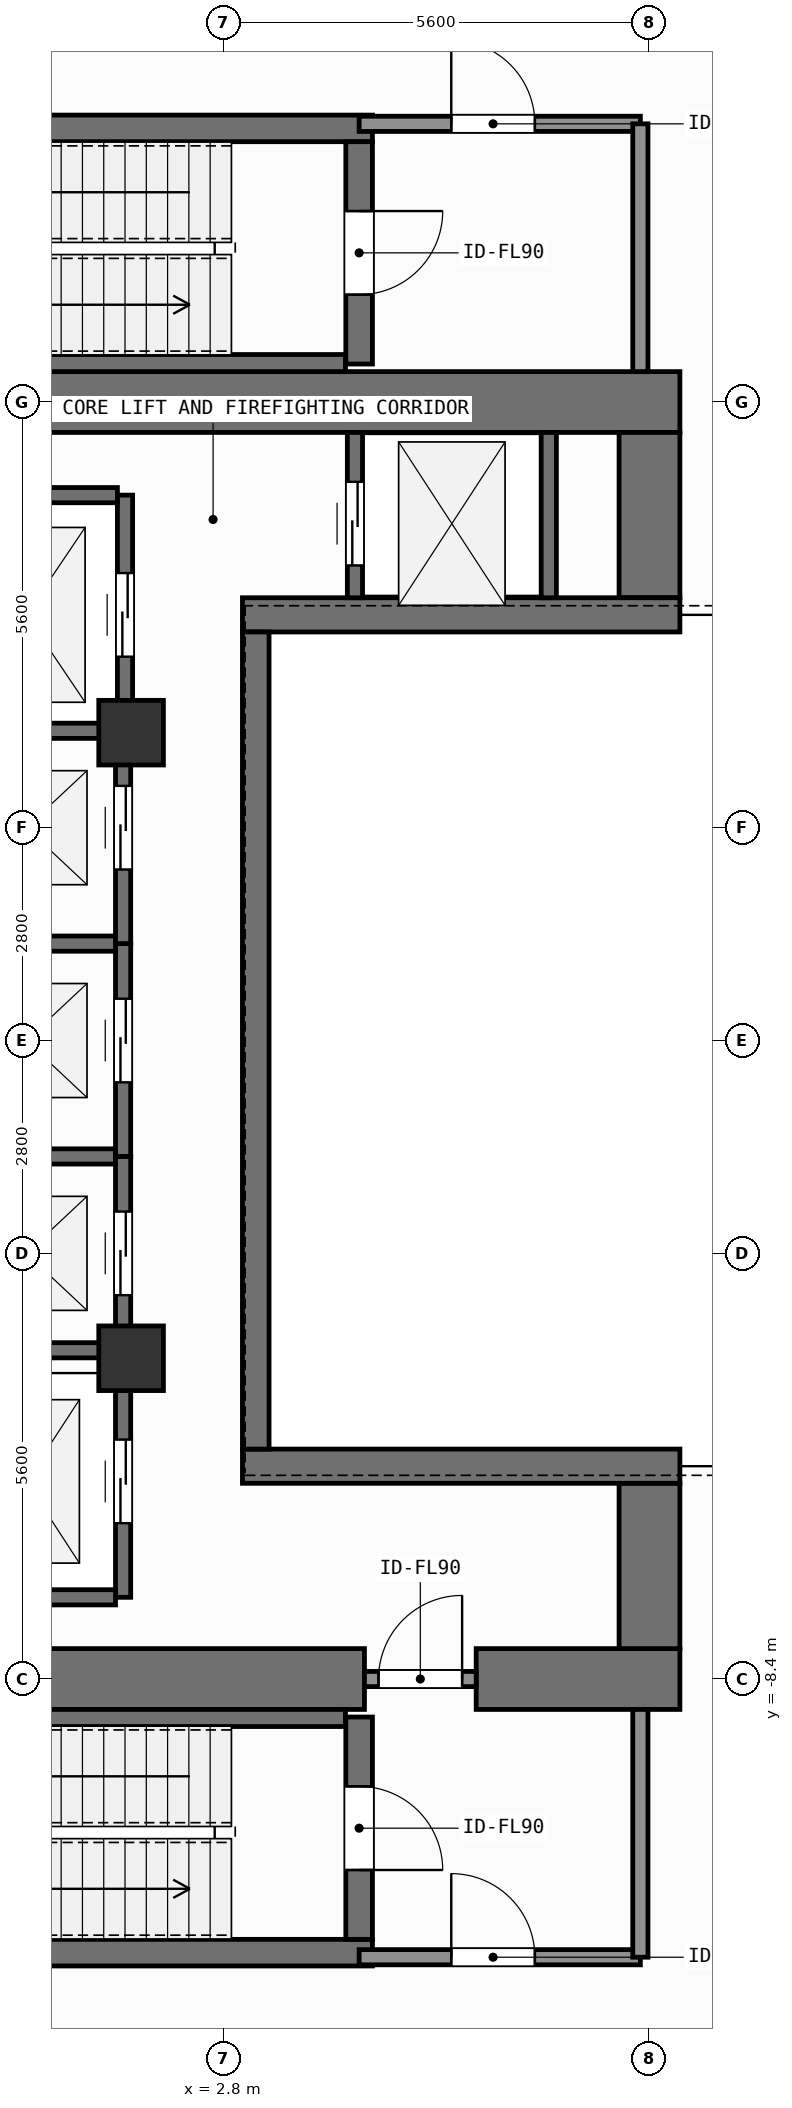
"""IFC4 building model, lengths in metres.
Left out: names, types, materials, properties, quantities, classifications, styles, units other than length and angle.
Written with IfcOpenShell. Run it as: python <this file> out.ifc"""

import sys

from ifc_helpers import new_model, si_unit, direction, frame, frame_2d, origin, origin_2d, place, context, subcontext, project, spatial, rectangle, extrude, element, fill, save


model = new_model("IFC4")
c1 = context("Model", 3, precision=1e-05, world=origin(), true_north=direction((0.0, 1.0)))
c2 = subcontext(c1, "Body", "Model", "MODEL_VIEW")
j1 = project(units=[si_unit("LENGTHUNIT", "METRE"), si_unit("PLANEANGLEUNIT", "RADIAN")], contexts=[c1])
p1 = place(None, origin())
s1 = spatial("IfcSite", under=j1, at=p1, CompositionType="ELEMENT")
p2 = place(p1, origin())
s2 = spatial("IfcBuilding", under=s1, at=p2, CompositionType="ELEMENT")
p3 = place(p2, frame((0.0, 0.0, 210.9)))
s3 = spatial("IfcBuildingStorey", under=s2, at=p3, CompositionType="ELEMENT", Elevation=210.9)
p4 = place(p3, frame((-2.62, -8.4, 0.0), z_axis=(0.0, 0.0, 1.0), x_axis=(1.0, 0.0, 0.0)))
e1 = element("IfcWall", 1, at=p4, inside=s3, PredefinedType="SHEAR", context=c2, shape_type="SweptSolid", body=[
    extrude(rectangle(XDim=7.27, YDim=0.8, at=frame_2d((3.635, 0.0))), origin(), (0.0, 0.0, 1.0), 4.8),
])
p5 = place(p3, frame((6.12, -8.4, 0.0), z_axis=(0.0, 0.0, 1.0), x_axis=(1.0, 0.0, 0.0)))
e2 = element("IfcWall", 2, at=p5, inside=s3, PredefinedType="SHEAR", context=c2, shape_type="SweptSolid", body=[
    extrude(rectangle(XDim=2.68, YDim=0.8, at=frame_2d((1.34, 0.0))), origin(), (0.0, 0.0, 1.0), 4.8),
])
p6 = place(p3, frame((-7.55, 8.4, 0.0), z_axis=(0.0, 0.0, 1.0), x_axis=(1.0, 0.0, 0.0)))
e3 = element("IfcWall", 3, at=p6, inside=s3, PredefinedType="SHEAR", context=c2, shape_type="SweptSolid", body=[
    extrude(rectangle(XDim=16.35, YDim=0.8, at=frame_2d((8.175, 0.0))), origin(), (0.0, 0.0, 1.0), 4.8),
])
for number, where, z_axis, x_axis in (
    (4, (8.4, -8.0, 0.0), (0.0, 0.0, 1.0), (0.0, 1.0, 0.0)),
    (5, (8.4, 5.825, 0.0), (0.0, 0.0, 1.0), (0.0, 1.0, 0.0)),
):
    element("IfcWall", number, at=place(p3, frame(where, z_axis=z_axis, x_axis=x_axis)), inside=s3, PredefinedType="SHEAR", context=c2, shape_type="SweptSolid", body=[
        extrude(rectangle(XDim=2.175, YDim=0.8, at=frame_2d((1.087, 0.0))), origin(), (0.0, 0.0, 1.0), 4.8),
    ])
for number, where, z_axis, x_axis in (
    (6, (3.045, -5.6, 0.0), (0.0, 0.0, 1.0), (1.0, 0.0, 0.0)),
    (7, (3.045, 5.6, 0.0), (0.0, 0.0, 1.0), (1.0, 0.0, 0.0)),
):
    element("IfcWall", number, at=place(p3, frame(where, z_axis=z_axis, x_axis=x_axis)), inside=s3, PredefinedType="SHEAR", context=c2, shape_type="SweptSolid", body=[
        extrude(rectangle(XDim=5.755, YDim=0.45, at=frame_2d((2.877, 0.0))), origin(), (0.0, 0.0, 1.0), 4.8),
    ])
p7 = place(p3, frame((3.22, -5.375, 0.0), z_axis=(0.0, 0.0, 1.0), x_axis=(0.0, 1.0, 0.0)))
e8 = element("IfcWall", 8, at=p7, inside=s3, PredefinedType="SHEAR", context=c2, shape_type="SweptSolid", body=[
    extrude(rectangle(XDim=10.75, YDim=0.35, at=frame_2d((5.375, 0.0))), origin(), (0.0, 0.0, 1.0), 4.8),
])
p8 = place(p3, frame((-2.555, -12.0, 0.0), z_axis=(0.0, 0.0, 1.0), x_axis=(1.0, 0.0, 0.0)))
e9 = element("IfcWall", 9, at=p8, inside=s3, PredefinedType="SHEAR", context=c2, shape_type="SweptSolid", body=[
    extrude(rectangle(XDim=7.31, YDim=0.35, at=frame_2d((3.655, 0.0))), origin(), (0.0, 0.0, 1.0), 4.8),
])
p9 = place(p3, frame((-2.2, -8.913, 0.0), z_axis=(0.0, 0.0, 1.0), x_axis=(1.0, 0.0, 0.0)))
e10 = element("IfcWall", 10, at=p9, inside=s3, PredefinedType="SHEAR", context=c2, shape_type="SweptSolid", body=[
    extrude(rectangle(XDim=6.6, YDim=0.225, at=frame_2d((3.3, 0.0))), origin(), (0.0, 0.0, 1.0), 4.8),
])
p10 = place(p3, frame((4.58, -8.9, 0.0), z_axis=(0.0, 0.0, 1.0), x_axis=(0.0, -1.0, 0.0)))
e11 = element("IfcWall", 11, at=p10, inside=s3, PredefinedType="SHEAR", context=c2, shape_type="SweptSolid", body=[
    extrude(rectangle(XDim=2.925, YDim=0.35, at=frame_2d((1.462, 0.0))), origin(), (0.0, 0.0, 1.0), 4.8),
])
p11 = place(p10, frame((0.913, 0.0, 0.0)))
e12 = element("IfcOpeningElement", 12, at=p11, cuts=e11, PredefinedType="OPENING", context=c2, shape_type="SweptSolid", body=[
    extrude(rectangle(XDim=1.1, YDim=2.15, at=frame_2d((0.55, 1.075))), frame((0.0, 0.185, 0.0), z_axis=(0.0, -1.0, 0.0), x_axis=(1.0, 0.0, 0.0)), (0.0, 0.0, 1.0), 0.37),
])
p12 = place(p3, frame((-2.555, 12.0, 0.0), z_axis=(0.0, 0.0, 1.0), x_axis=(1.0, 0.0, 0.0)))
e13 = element("IfcWall", 13, at=p12, inside=s3, PredefinedType="SHEAR", context=c2, shape_type="SweptSolid", body=[
    extrude(rectangle(XDim=7.31, YDim=0.35, at=frame_2d((3.655, 0.0))), origin(), (0.0, 0.0, 1.0), 4.8),
])
p13 = place(p3, frame((-2.2, 8.913, 0.0), z_axis=(0.0, 0.0, 1.0), x_axis=(1.0, 0.0, 0.0)))
e14 = element("IfcWall", 14, at=p13, inside=s3, PredefinedType="SHEAR", context=c2, shape_type="SweptSolid", body=[
    extrude(rectangle(XDim=6.6, YDim=0.225, at=frame_2d((3.3, 0.0))), origin(), (0.0, 0.0, 1.0), 4.8),
])
p14 = place(p3, frame((4.58, 11.825, 0.0), z_axis=(0.0, 0.0, 1.0), x_axis=(0.0, -1.0, 0.0)))
e15 = element("IfcWall", 15, at=p14, inside=s3, PredefinedType="SHEAR", context=c2, shape_type="SweptSolid", body=[
    extrude(rectangle(XDim=2.925, YDim=0.35, at=frame_2d((1.462, 0.0))), origin(), (0.0, 0.0, 1.0), 4.8),
])
p15 = place(p14, frame((0.913, 0.0, 0.0)))
e16 = element("IfcOpeningElement", 16, at=p15, cuts=e15, PredefinedType="OPENING", context=c2, shape_type="SweptSolid", body=[
    extrude(rectangle(XDim=1.1, YDim=2.15, at=frame_2d((0.55, 1.075))), frame((0.0, 0.185, 0.0), z_axis=(0.0, -1.0, 0.0), x_axis=(1.0, 0.0, 0.0)), (0.0, 0.0, 1.0), 0.37),
])
for number, where, z_axis, x_axis in (
    (17, (1.58, -4.18, 0.0), (0.0, 0.0, 1.0), (1.0, 0.0, 0.0)),
    (18, (1.58, 4.05, 0.0), (0.0, 0.0, 1.0), (1.0, 0.0, 0.0)),
):
    element("IfcColumn", number, at=place(p3, frame(where, z_axis=z_axis, x_axis=x_axis)), inside=s3, PredefinedType="COLUMN", context=c2, shape_type="SweptSolid", body=[
        extrude(rectangle(XDim=0.85, YDim=0.85, at=origin_2d()), origin(), (0.0, 0.0, 1.0), 4.8),
    ])
p16 = place(p3, frame((1.475, -4.275, 0.0), z_axis=(0.0, 0.0, 1.0), x_axis=(0.0, 1.0, 0.0)))
e19 = element("IfcWall", 19, at=p16, inside=s3, PredefinedType="SHEAR", context=c2, shape_type="SweptSolid", body=[
    extrude(rectangle(XDim=2.75, YDim=0.2, at=frame_2d((1.375, 0.0))), origin(), (0.0, 0.0, 1.0), 4.58),
])
p17 = place(p16, frame((0.925, 0.0, 0.0)))
e20 = element("IfcOpeningElement", 20, at=p17, cuts=e19, PredefinedType="OPENING", context=c2, shape_type="SweptSolid", body=[
    extrude(rectangle(XDim=1.1, YDim=2.2, at=frame_2d((0.55, 1.1))), frame((0.0, 0.11, 0.0), z_axis=(0.0, -1.0, 0.0), x_axis=(1.0, 0.0, 0.0)), (0.0, 0.0, 1.0), 0.22),
])
for number, where, z_axis, x_axis in (
    (21, (-0.975, -4.075, 0.0), (0.0, 0.0, 1.0), (1.0, 0.0, 0.0)),
    (22, (-0.975, -1.525, 0.0), (0.0, 0.0, 1.0), (1.0, 0.0, 0.0)),
):
    element("IfcWall", number, at=place(p3, frame(where, z_axis=z_axis, x_axis=x_axis)), inside=s3, PredefinedType="SHEAR", context=c2, shape_type="SweptSolid", body=[
        extrude(rectangle(XDim=2.35, YDim=0.2, at=frame_2d((1.175, 0.0))), origin(), (0.0, 0.0, 1.0), 4.58),
    ])
p18 = place(p3, frame((1.475, -1.525, 0.0), z_axis=(0.0, 0.0, 1.0), x_axis=(0.0, 1.0, 0.0)))
e23 = element("IfcWall", 23, at=p18, inside=s3, PredefinedType="SHEAR", context=c2, shape_type="SweptSolid", body=[
    extrude(rectangle(XDim=2.8, YDim=0.2, at=frame_2d((1.4, 0.0))), origin(), (0.0, 0.0, 1.0), 4.58),
])
p19 = place(p18, frame((0.975, 0.0, 0.0)))
e24 = element("IfcOpeningElement", 24, at=p19, cuts=e23, PredefinedType="OPENING", context=c2, shape_type="SweptSolid", body=[
    extrude(rectangle(XDim=1.1, YDim=2.2, at=frame_2d((0.55, 1.1))), frame((0.0, 0.11, 0.0), z_axis=(0.0, -1.0, 0.0), x_axis=(1.0, 0.0, 0.0)), (0.0, 0.0, 1.0), 0.22),
])
p20 = place(p3, frame((-0.975, 1.275, 0.0), z_axis=(0.0, 0.0, 1.0), x_axis=(1.0, 0.0, 0.0)))
e25 = element("IfcWall", 25, at=p20, inside=s3, PredefinedType="SHEAR", context=c2, shape_type="SweptSolid", body=[
    extrude(rectangle(XDim=2.35, YDim=0.2, at=frame_2d((1.175, 0.0))), origin(), (0.0, 0.0, 1.0), 4.58),
])
p21 = place(p3, frame((1.475, 1.275, 0.0), z_axis=(0.0, 0.0, 1.0), x_axis=(0.0, 1.0, 0.0)))
e26 = element("IfcWall", 26, at=p21, inside=s3, PredefinedType="SHEAR", context=c2, shape_type="SweptSolid", body=[
    extrude(rectangle(XDim=2.8, YDim=0.2, at=frame_2d((1.4, 0.0))), origin(), (0.0, 0.0, 1.0), 4.58),
])
p22 = place(p21, frame((0.975, 0.0, 0.0)))
e27 = element("IfcOpeningElement", 27, at=p22, cuts=e26, PredefinedType="OPENING", context=c2, shape_type="SweptSolid", body=[
    extrude(rectangle(XDim=1.1, YDim=2.2, at=frame_2d((0.55, 1.1))), frame((0.0, 0.11, 0.0), z_axis=(0.0, -1.0, 0.0), x_axis=(1.0, 0.0, 0.0)), (0.0, 0.0, 1.0), 0.22),
])
p23 = place(p3, frame((-0.975, 4.075, 0.0), z_axis=(0.0, 0.0, 1.0), x_axis=(1.0, 0.0, 0.0)))
e28 = element("IfcWall", 28, at=p23, inside=s3, PredefinedType="SHEAR", context=c2, shape_type="SweptSolid", body=[
    extrude(rectangle(XDim=2.35, YDim=0.2, at=frame_2d((1.175, 0.0))), origin(), (0.0, 0.0, 1.0), 4.58),
])
p24 = place(p3, frame((1.5, 4.025, 0.0), z_axis=(0.0, 0.0, 1.0), x_axis=(0.0, 1.0, 0.0)))
e29 = element("IfcWall", 29, at=p24, inside=s3, PredefinedType="SHEAR", context=c2, shape_type="SweptSolid", body=[
    extrude(rectangle(XDim=3.15, YDim=0.2, at=frame_2d((1.575, 0.0))), origin(), (0.0, 0.0, 1.0), 4.58),
])
p25 = place(p24, frame((1.025, 0.0, 0.0)))
e30 = element("IfcOpeningElement", 30, at=p25, cuts=e29, PredefinedType="OPENING", context=c2, shape_type="SweptSolid", body=[
    extrude(rectangle(XDim=1.1, YDim=2.2, at=frame_2d((0.55, 1.1))), frame((0.0, 0.11, 0.0), z_axis=(0.0, -1.0, 0.0), x_axis=(1.0, 0.0, 0.0)), (0.0, 0.0, 1.0), 0.22),
])
p26 = place(p3, frame((-1.0, 7.175, 0.0), z_axis=(0.0, 0.0, 1.0), x_axis=(1.0, 0.0, 0.0)))
e31 = element("IfcWall", 31, at=p26, inside=s3, PredefinedType="SHEAR", context=c2, shape_type="SweptSolid", body=[
    extrude(rectangle(XDim=2.4, YDim=0.2, at=frame_2d((1.2, 0.0))), origin(), (0.0, 0.0, 1.0), 4.58),
])
p27 = place(p3, frame((1.475, -7.325, 0.0), z_axis=(0.0, 0.0, 1.0), x_axis=(0.0, 1.0, 0.0)))
e32 = element("IfcWall", 32, at=p27, inside=s3, PredefinedType="SHEAR", context=c2, shape_type="SweptSolid", body=[
    extrude(rectangle(XDim=3.05, YDim=0.2, at=frame_2d((1.525, 0.0))), origin(), (0.0, 0.0, 1.0), 4.58),
])
p28 = place(p27, frame((0.975, 0.0, 0.0)))
e33 = element("IfcOpeningElement", 33, at=p28, cuts=e32, PredefinedType="OPENING", context=c2, shape_type="SweptSolid", body=[
    extrude(rectangle(XDim=1.1, YDim=2.2, at=frame_2d((0.55, 1.1))), frame((0.0, 0.11, 0.0), z_axis=(0.0, -1.0, 0.0), x_axis=(1.0, 0.0, 0.0)), (0.0, 0.0, 1.0), 0.22),
])
p29 = place(p3, frame((-0.975, -7.325, 0.0), z_axis=(0.0, 0.0, 1.0), x_axis=(1.0, 0.0, 0.0)))
e34 = element("IfcWall", 34, at=p29, inside=s3, PredefinedType="SHEAR", context=c2, shape_type="SweptSolid", body=[
    extrude(rectangle(XDim=2.35, YDim=0.2, at=frame_2d((1.175, 0.0))), origin(), (0.0, 0.0, 1.0), 4.58),
])
p30 = place(p3, frame((4.525, 5.825, 0.0), z_axis=(0.0, 0.0, 1.0), x_axis=(0.0, 1.0, 0.0)))
e35 = element("IfcWall", 35, at=p30, inside=s3, PredefinedType="SHEAR", context=c2, shape_type="SweptSolid", body=[
    extrude(rectangle(XDim=2.175, YDim=0.2, at=frame_2d((1.087, 0.0))), origin(), (0.0, 0.0, 1.0), 4.58),
])
p31 = place(p30, frame((0.425, 0.0, 0.0)))
e36 = element("IfcOpeningElement", 36, at=p31, cuts=e35, PredefinedType="OPENING", context=c2, shape_type="SweptSolid", body=[
    extrude(rectangle(XDim=1.1, YDim=2.2, at=frame_2d((0.55, 1.1))), frame((0.0, 0.11, 0.0), z_axis=(0.0, -1.0, 0.0), x_axis=(1.0, 0.0, 0.0)), (0.0, 0.0, 1.0), 0.22),
])
p32 = place(p3, frame((7.075, 5.825, 0.0), z_axis=(0.0, 0.0, 1.0), x_axis=(0.0, 1.0, 0.0)))
e37 = element("IfcWall", 37, at=p32, inside=s3, PredefinedType="SHEAR", context=c2, shape_type="SweptSolid", body=[
    extrude(rectangle(XDim=2.175, YDim=0.2, at=frame_2d((1.087, 0.0))), origin(), (0.0, 0.0, 1.0), 4.58),
])
p33 = place(p3, frame((4.58, -12.06, 0.0), z_axis=(0.0, 0.0, 1.0), x_axis=(1.0, 0.0, 0.0)))
e38 = element("IfcWall", 38, at=p33, inside=s3, PredefinedType="SOLIDWALL", context=c2, shape_type="SweptSolid", body=[
    extrude(rectangle(XDim=3.7, YDim=0.2, at=frame_2d((1.85, 0.0))), origin(), (0.0, 0.0, 1.0), 4.58),
])
p34 = place(p33, frame((1.212, 0.0, 0.0)))
e39 = element("IfcOpeningElement", 39, at=p34, cuts=e38, PredefinedType="OPENING", context=c2, shape_type="SweptSolid", body=[
    extrude(rectangle(XDim=1.1, YDim=2.15, at=frame_2d((0.55, 1.075))), frame((0.0, 0.11, 0.0), z_axis=(0.0, -1.0, 0.0), x_axis=(1.0, 0.0, 0.0)), (0.0, 0.0, 1.0), 0.22),
])
p35 = place(p3, frame((4.65, -8.4, 0.0), z_axis=(0.0, 0.0, 1.0), x_axis=(1.0, 0.0, 0.0)))
e40 = element("IfcWall", 40, at=p35, inside=s3, PredefinedType="SOLIDWALL", context=c2, shape_type="SweptSolid", body=[
    extrude(rectangle(XDim=1.47, YDim=0.2, at=frame_2d((0.735, 0.0))), origin(), (0.0, 0.0, 1.0), 3.72),
])
p36 = place(p35, frame((0.185, 0.0, 0.0)))
e41 = element("IfcOpeningElement", 41, at=p36, cuts=e40, PredefinedType="OPENING", context=c2, shape_type="SweptSolid", body=[
    extrude(rectangle(XDim=1.1, YDim=2.15, at=frame_2d((0.55, 1.075))), frame((0.0, 0.11, 0.0), z_axis=(0.0, -1.0, 0.0), x_axis=(1.0, 0.0, 0.0)), (0.0, 0.0, 1.0), 0.22),
])
p37 = place(p3, frame((4.58, 12.06, 0.0), z_axis=(0.0, 0.0, 1.0), x_axis=(1.0, 0.0, 0.0)))
e42 = element("IfcWall", 42, at=p37, inside=s3, PredefinedType="SOLIDWALL", context=c2, shape_type="SweptSolid", body=[
    extrude(rectangle(XDim=3.7, YDim=0.2, at=frame_2d((1.85, 0.0))), origin(), (0.0, 0.0, 1.0), 4.58),
])
p38 = place(p37, frame((1.212, 0.0, 0.0)))
e43 = element("IfcOpeningElement", 43, at=p38, cuts=e42, PredefinedType="OPENING", context=c2, shape_type="SweptSolid", body=[
    extrude(rectangle(XDim=1.1, YDim=2.15, at=frame_2d((0.55, 1.075))), frame((0.0, 0.11, 0.0), z_axis=(0.0, -1.0, 0.0), x_axis=(1.0, 0.0, 0.0)), (0.0, 0.0, 1.0), 0.22),
])
for number, where, z_axis, x_axis in (
    (44, (8.28, -12.06, 0.0), (0.0, 0.0, 1.0), (0.0, 1.0, 0.0)),
    (45, (8.28, 8.8, 0.0), (0.0, 0.0, 1.0), (0.0, 1.0, 0.0)),
):
    element("IfcWall", number, at=place(p3, frame(where, z_axis=z_axis, x_axis=x_axis)), inside=s3, PredefinedType="SOLIDWALL", context=c2, shape_type="SweptSolid", body=[
        extrude(rectangle(XDim=3.26, YDim=0.2, at=frame_2d((1.63, 0.0))), origin(), (0.0, 0.0, 1.0), 4.58),
    ])
p39 = place(p17, origin())
e46 = element("IfcDoor", 46, at=p39, inside=s3, OperationType="SLIDING_TO_LEFT", PredefinedType="DOOR", context=c2, shape_type="SweptSolid", body=[
    extrude(rectangle(XDim=1.1, YDim=2.2, at=frame_2d((0.55, 1.1))), frame((0.0, 0.025, 0.0), z_axis=(0.0, -1.0, 0.0), x_axis=(1.0, 0.0, 0.0)), (0.0, 0.0, 1.0), 0.05),
])
fill(e20, e46)
p40 = place(p19, origin())
e47 = element("IfcDoor", 47, at=p40, inside=s3, OperationType="SLIDING_TO_LEFT", PredefinedType="DOOR", context=c2, shape_type="SweptSolid", body=[
    extrude(rectangle(XDim=1.1, YDim=2.2, at=frame_2d((0.55, 1.1))), frame((0.0, 0.025, 0.0), z_axis=(0.0, -1.0, 0.0), x_axis=(1.0, 0.0, 0.0)), (0.0, 0.0, 1.0), 0.05),
])
fill(e24, e47)
p41 = place(p22, origin())
e48 = element("IfcDoor", 48, at=p41, inside=s3, OperationType="SLIDING_TO_LEFT", PredefinedType="DOOR", context=c2, shape_type="SweptSolid", body=[
    extrude(rectangle(XDim=1.1, YDim=2.2, at=frame_2d((0.55, 1.1))), frame((0.0, 0.025, 0.0), z_axis=(0.0, -1.0, 0.0), x_axis=(1.0, 0.0, 0.0)), (0.0, 0.0, 1.0), 0.05),
])
fill(e27, e48)
p42 = place(p25, origin())
e49 = element("IfcDoor", 49, at=p42, inside=s3, OperationType="SLIDING_TO_LEFT", PredefinedType="DOOR", context=c2, shape_type="SweptSolid", body=[
    extrude(rectangle(XDim=1.1, YDim=2.2, at=frame_2d((0.55, 1.1))), frame((0.0, 0.025, 0.0), z_axis=(0.0, -1.0, 0.0), x_axis=(1.0, 0.0, 0.0)), (0.0, 0.0, 1.0), 0.05),
])
fill(e30, e49)
p43 = place(p28, origin())
e50 = element("IfcDoor", 50, at=p43, inside=s3, OperationType="SLIDING_TO_LEFT", PredefinedType="DOOR", context=c2, shape_type="SweptSolid", body=[
    extrude(rectangle(XDim=1.1, YDim=2.2, at=frame_2d((0.55, 1.1))), frame((0.0, 0.025, 0.0), z_axis=(0.0, -1.0, 0.0), x_axis=(1.0, 0.0, 0.0)), (0.0, 0.0, 1.0), 0.05),
])
fill(e33, e50)
p44 = place(p31, origin())
e51 = element("IfcDoor", 51, at=p44, inside=s3, OperationType="SLIDING_TO_LEFT", PredefinedType="DOOR", context=c2, shape_type="SweptSolid", body=[
    extrude(rectangle(XDim=1.1, YDim=2.2, at=frame_2d((0.55, 1.1))), frame((0.0, 0.025, 0.0), z_axis=(0.0, -1.0, 0.0), x_axis=(1.0, 0.0, 0.0)), (0.0, 0.0, 1.0), 0.05),
])
fill(e36, e51)
p45 = place(p11, origin())
e52 = element("IfcDoor", 52, at=p45, inside=s3, OperationType="SINGLE_SWING_RIGHT", PredefinedType="DOOR", context=c2, shape_type="SweptSolid", body=[
    extrude(rectangle(XDim=1.1, YDim=2.15, at=frame_2d((0.55, 1.075))), frame((0.0, 0.025, 0.0), z_axis=(0.0, -1.0, 0.0), x_axis=(1.0, 0.0, 0.0)), (0.0, 0.0, 1.0), 0.05),
])
fill(e12, e52)
p46 = place(p15, origin())
e53 = element("IfcDoor", 53, at=p46, inside=s3, OperationType="SINGLE_SWING_LEFT", PredefinedType="DOOR", context=c2, shape_type="SweptSolid", body=[
    extrude(rectangle(XDim=1.1, YDim=2.15, at=frame_2d((0.55, 1.075))), frame((0.0, 0.025, 0.0), z_axis=(0.0, -1.0, 0.0), x_axis=(1.0, 0.0, 0.0)), (0.0, 0.0, 1.0), 0.05),
])
fill(e16, e53)
p47 = place(p34, origin())
e54 = element("IfcDoor", 54, at=p47, inside=s3, OperationType="SINGLE_SWING_LEFT", PredefinedType="DOOR", context=c2, shape_type="SweptSolid", body=[
    extrude(rectangle(XDim=1.1, YDim=2.15, at=frame_2d((0.55, 1.075))), frame((0.0, 0.025, 0.0), z_axis=(0.0, -1.0, 0.0), x_axis=(1.0, 0.0, 0.0)), (0.0, 0.0, 1.0), 0.05),
])
fill(e39, e54)
p48 = place(p36, origin())
e55 = element("IfcDoor", 55, at=p48, inside=s3, OperationType="SINGLE_SWING_RIGHT", PredefinedType="DOOR", context=c2, shape_type="SweptSolid", body=[
    extrude(rectangle(XDim=1.1, YDim=2.15, at=frame_2d((0.55, 1.075))), frame((0.0, 0.025, 0.0), z_axis=(0.0, -1.0, 0.0), x_axis=(1.0, 0.0, 0.0)), (0.0, 0.0, 1.0), 0.05),
])
fill(e41, e55)
p49 = place(p38, origin())
e56 = element("IfcDoor", 56, at=p49, inside=s3, OperationType="SINGLE_SWING_LEFT", PredefinedType="DOOR", context=c2, shape_type="SweptSolid", body=[
    extrude(rectangle(XDim=1.1, YDim=2.15, at=frame_2d((0.55, 1.075))), frame((0.0, 0.025, 0.0), z_axis=(0.0, -1.0, 0.0), x_axis=(1.0, 0.0, 0.0)), (0.0, 0.0, 1.0), 0.05),
])
fill(e43, e56)
save(model, sys.argv[1])
